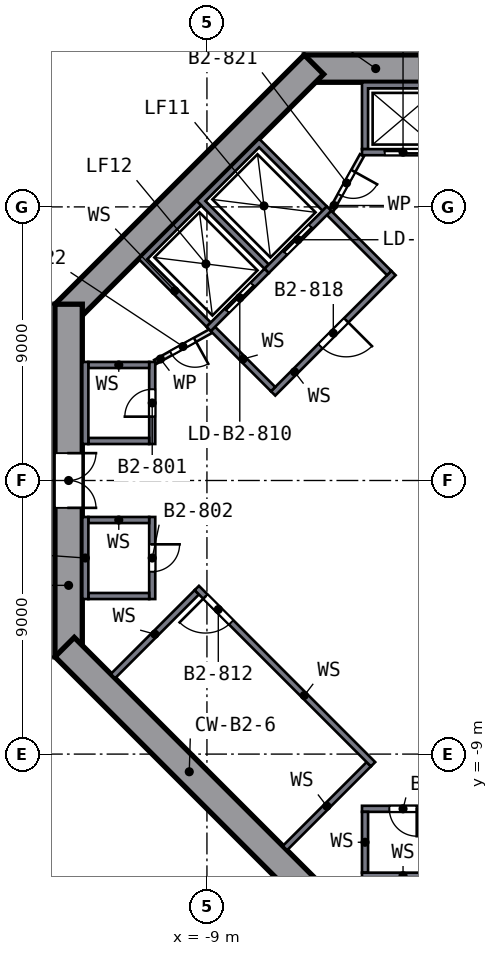
"""IFC4 building model, lengths in metres.
Left out: names, types, materials, properties, quantities, classifications, styles, units other than length and angle.
Written with IfcOpenShell. Run it as: python <this file> out.ifc"""

import sys

from ifc_helpers import new_model, si_unit, direction, frame, frame_2d, origin, place, context, subcontext, project, spatial, polyline, rectangle, outline, extrude, element, fill, save


model = new_model("IFC4")
c1 = context("Model", 3, precision=1e-05, world=origin(), true_north=direction((0.0, 1.0)))
c2 = subcontext(c1, "Body", "Model", "MODEL_VIEW")
j1 = project(units=[si_unit("LENGTHUNIT", "METRE"), si_unit("PLANEANGLEUNIT", "RADIAN")], contexts=[c1])
p1 = place(None, origin())
s1 = spatial("IfcSite", under=j1, at=p1, CompositionType="ELEMENT")
p2 = place(p1, origin())
s2 = spatial("IfcBuilding", under=s1, at=p2, CompositionType="ELEMENT")
p3 = place(p2, frame((0.0, 0.0, -7.8)))
s3 = spatial("IfcBuildingStorey", under=s2, at=p3, CompositionType="ELEMENT", Elevation=-7.8)
p4 = place(p3, frame((5.799, 13.55, 0.0), z_axis=(0.0, 0.0, 1.0), x_axis=(-1.0, 0.0, 0.0)))
e1 = element("IfcWall", 1, at=p4, inside=s3, PredefinedType="SHEAR", context=c2, shape_type="SweptSolid", body=[
    extrude(rectangle(XDim=11.598, YDim=0.9, at=frame_2d((5.799, 0.0))), origin(), (0.0, 0.0, 1.0), 3.9),
])
p5 = place(p4, frame((4.899, 0.0, 0.0)))
e2 = element("IfcOpeningElement", 2, at=p5, cuts=e1, PredefinedType="OPENING", context=c2, shape_type="SweptSolid", body=[
    extrude(rectangle(XDim=1.8, YDim=2.1, at=frame_2d((0.9, 1.05))), frame((0.0, 0.46, 0.0), z_axis=(0.0, -1.0, 0.0), x_axis=(1.0, 0.0, 0.0)), (0.0, 0.0, 1.0), 0.92),
])
p6 = place(p3, frame((-5.481, 13.682, 0.0), z_axis=(0.0, 0.0, 1.0), x_axis=(-0.707106781, -0.707106781, 0.0)))
e3 = element("IfcWall", 3, at=p6, inside=s3, PredefinedType="SHEAR", context=c2, shape_type="SweptSolid", body=[
    extrude(rectangle(XDim=11.598, YDim=0.9, at=frame_2d((5.799, 0.0))), origin(), (0.0, 0.0, 1.0), 3.9),
])
p7 = place(p3, frame((-13.55, 5.799, 0.0), z_axis=(0.0, 0.0, 1.0), x_axis=(0.0, -1.0, 0.0)))
e4 = element("IfcWall", 4, at=p7, inside=s3, PredefinedType="SHEAR", context=c2, shape_type="SweptSolid", body=[
    extrude(rectangle(XDim=11.598, YDim=0.9, at=frame_2d((5.799, 0.0))), origin(), (0.0, 0.0, 1.0), 3.9),
])
p8 = place(p7, frame((4.899, 0.0, 0.0)))
e5 = element("IfcOpeningElement", 5, at=p8, cuts=e4, PredefinedType="OPENING", context=c2, shape_type="SweptSolid", body=[
    extrude(rectangle(XDim=1.8, YDim=2.1, at=frame_2d((0.9, 1.05))), frame((0.0, 0.46, 0.0), z_axis=(0.0, -1.0, 0.0), x_axis=(1.0, 0.0, 0.0)), (0.0, 0.0, 1.0), 0.92),
])
p9 = place(p3, frame((-13.682, -5.481, 0.0), z_axis=(0.0, 0.0, 1.0), x_axis=(0.707106781, -0.707106781, 0.0)))
e6 = element("IfcWall", 6, at=p9, inside=s3, PredefinedType="SHEAR", context=c2, shape_type="SweptSolid", body=[
    extrude(rectangle(XDim=11.598, YDim=0.9, at=frame_2d((5.799, 0.0))), origin(), (0.0, 0.0, 1.0), 3.9),
])
p10 = place(p3, origin())
e7 = element("IfcWall", 7, at=p10, inside=s3, PredefinedType="SOLIDWALL", context=c2, shape_type="SweptSolid", body=[
    extrude(outline(polyline([(-3.9, 10.9), (-3.9, 13.1), (-1.2, 13.1), (-1.2, 10.9), (-1.4, 10.9), (-1.4, 12.9), (-3.7, 12.9), (-3.7, 10.9), (-3.9, 10.9)])), origin(), (0.0, 0.0, 1.0), 3.45),
])
p11 = place(p3, frame((-1.2, 10.8, 0.0), z_axis=(0.0, 0.0, 1.0), x_axis=(-1.0, 0.0, 0.0)))
e8 = element("IfcWall", 8, at=p11, inside=s3, PredefinedType="SOLIDWALL", context=c2, shape_type="SweptSolid", body=[
    extrude(rectangle(XDim=2.7, YDim=0.2, at=frame_2d((1.35, 0.0))), origin(), (0.0, 0.0, 1.0), 3.45),
])
p12 = place(p11, frame((0.75, 0.0, 0.0)))
e9 = element("IfcOpeningElement", 9, at=p12, cuts=e8, PredefinedType="OPENING", context=c2, shape_type="SweptSolid", body=[
    extrude(rectangle(XDim=1.2, YDim=2.1, at=frame_2d((0.6, 1.05))), frame((0.0, 0.11, 0.0), z_axis=(0.0, -1.0, 0.0), x_axis=(1.0, 0.0, 0.0)), (0.0, 0.0, 1.0), 0.22),
])
p13 = place(p3, origin())
e10 = element("IfcWall", 10, at=p13, inside=s3, PredefinedType="SOLIDWALL", context=c2, shape_type="SweptSolid", body=[
    extrude(outline(polyline([(-10.9, 1.2), (-12.9, 1.2), (-12.9, 1.4), (-10.9, 1.4), (-10.9, 1.2)])), origin(), (0.0, 0.0, 1.0), 3.45),
])
p14 = place(p3, origin())
e11 = element("IfcWall", 11, at=p14, inside=s3, PredefinedType="SOLIDWALL", context=c2, shape_type="SweptSolid", body=[
    extrude(outline(polyline([(-10.9, 3.7), (-12.9, 3.7), (-12.9, 3.9), (-10.9, 3.9), (-10.9, 3.7)])), origin(), (0.0, 0.0, 1.0), 3.45),
])
p15 = place(p3, origin())
e12 = element("IfcWall", 12, at=p15, inside=s3, PredefinedType="SOLIDWALL", context=c2, shape_type="SweptSolid", body=[
    extrude(outline(polyline([(-12.9, 1.2), (-13.1, 1.2), (-13.1, 3.9), (-12.9, 3.9), (-12.9, 1.2)])), origin(), (0.0, 0.0, 1.0), 3.45),
])
p16 = place(p3, frame((-10.8, 1.2, 0.0), z_axis=(0.0, 0.0, 1.0), x_axis=(0.0, 1.0, 0.0)))
e13 = element("IfcWall", 13, at=p16, inside=s3, PredefinedType="SOLIDWALL", context=c2, shape_type="SweptSolid", body=[
    extrude(rectangle(XDim=2.7, YDim=0.2, at=frame_2d((1.35, 0.0))), origin(), (0.0, 0.0, 1.0), 3.45),
])
p17 = place(p16, frame((0.9, 0.0, 0.0)))
e14 = element("IfcOpeningElement", 14, at=p17, cuts=e13, PredefinedType="OPENING", context=c2, shape_type="SweptSolid", body=[
    extrude(rectangle(XDim=0.9, YDim=2.1, at=frame_2d((0.45, 1.05))), frame((0.0, 0.11, 0.0), z_axis=(0.0, -1.0, 0.0), x_axis=(1.0, 0.0, 0.0)), (0.0, 0.0, 1.0), 0.22),
])
p18 = place(p3, origin())
e15 = element("IfcWall", 15, at=p18, inside=s3, PredefinedType="SOLIDWALL", context=c2, shape_type="SweptSolid", body=[
    extrude(outline(polyline([(-10.9, -1.2), (-10.9, -1.4), (-12.9, -1.4), (-12.9, -1.2), (-10.9, -1.2)])), origin(), (0.0, 0.0, 1.0), 3.45),
])
p19 = place(p3, origin())
e16 = element("IfcWall", 16, at=p19, inside=s3, PredefinedType="SOLIDWALL", context=c2, shape_type="SweptSolid", body=[
    extrude(outline(polyline([(-10.9, -3.7), (-10.9, -3.9), (-12.9, -3.9), (-12.9, -3.7), (-10.9, -3.7)])), origin(), (0.0, 0.0, 1.0), 3.45),
])
p20 = place(p3, origin())
e17 = element("IfcWall", 17, at=p20, inside=s3, PredefinedType="SOLIDWALL", context=c2, shape_type="SweptSolid", body=[
    extrude(outline(polyline([(-12.9, -1.2), (-12.9, -3.9), (-13.1, -3.9), (-13.1, -1.2), (-12.9, -1.2)])), origin(), (0.0, 0.0, 1.0), 3.45),
])
p21 = place(p3, frame((-10.8, -1.2, 0.0), z_axis=(0.0, 0.0, 1.0), x_axis=(0.0, -1.0, 0.0)))
e18 = element("IfcWall", 18, at=p21, inside=s3, PredefinedType="SOLIDWALL", context=c2, shape_type="SweptSolid", body=[
    extrude(rectangle(XDim=2.7, YDim=0.2, at=frame_2d((1.35, 0.0))), origin(), (0.0, 0.0, 1.0), 3.45),
])
p22 = place(p21, frame((0.9, 0.0, 0.0)))
e19 = element("IfcOpeningElement", 19, at=p22, cuts=e18, PredefinedType="OPENING", context=c2, shape_type="SweptSolid", body=[
    extrude(rectangle(XDim=0.9, YDim=2.1, at=frame_2d((0.45, 1.05))), frame((0.0, 0.11, 0.0), z_axis=(0.0, -1.0, 0.0), x_axis=(1.0, 0.0, 0.0)), (0.0, 0.0, 1.0), 0.22),
])
p23 = place(p3, origin())
e20 = element("IfcWall", 20, at=p23, inside=s3, PredefinedType="SOLIDWALL", context=c2, shape_type="SweptSolid", body=[
    extrude(outline(polyline([(-3.7, -10.9), (-3.7, -12.9), (-3.9, -12.9), (-3.9, -10.9), (-3.7, -10.9)])), origin(), (0.0, 0.0, 1.0), 3.45),
])
p24 = place(p3, origin())
e21 = element("IfcWall", 21, at=p24, inside=s3, PredefinedType="SOLIDWALL", context=c2, shape_type="SweptSolid", body=[
    extrude(outline(polyline([(-1.2, -12.9), (-1.2, -13.1), (-3.9, -13.1), (-3.9, -12.9), (-1.2, -12.9)])), origin(), (0.0, 0.0, 1.0), 3.45),
])
p25 = place(p3, frame((-1.2, -10.8, 0.0), z_axis=(0.0, 0.0, 1.0), x_axis=(-1.0, 0.0, 0.0)))
e22 = element("IfcWall", 22, at=p25, inside=s3, PredefinedType="SOLIDWALL", context=c2, shape_type="SweptSolid", body=[
    extrude(rectangle(XDim=2.7, YDim=0.2, at=frame_2d((1.35, 0.0))), origin(), (0.0, 0.0, 1.0), 3.45),
])
p26 = place(p25, frame((0.9, 0.0, 0.0)))
e23 = element("IfcOpeningElement", 23, at=p26, cuts=e22, PredefinedType="OPENING", context=c2, shape_type="SweptSolid", body=[
    extrude(rectangle(XDim=0.9, YDim=2.1, at=frame_2d((0.45, 1.05))), frame((0.0, 0.11, 0.0), z_axis=(0.0, -1.0, 0.0), x_axis=(1.0, 0.0, 0.0)), (0.0, 0.0, 1.0), 0.22),
])
p27 = place(p3, origin())
e24 = element("IfcWall", 24, at=p27, inside=s3, PredefinedType="SOLIDWALL", context=c2, shape_type="SweptSolid", body=[
    extrude(outline(polyline([(-9.334, 9.192), (-7.283, 11.243), (-5.056, 9.016), (-5.197, 8.874), (-7.283, 10.96), (-9.051, 9.192), (-6.965, 7.106), (-7.106, 6.965), (-9.334, 9.192)])), origin(), (0.0, 0.0, 1.0), 3.45),
])
p28 = place(p3, frame((-4.985, 8.945, 0.0), z_axis=(0.0, 0.0, 1.0), x_axis=(-0.707106781, -0.707106781, 0.0)))
e25 = element("IfcWall", 25, at=p28, inside=s3, PredefinedType="SOLIDWALL", context=c2, shape_type="SweptSolid", body=[
    extrude(rectangle(XDim=2.9, YDim=0.2, at=frame_2d((1.45, 0.0))), origin(), (0.0, 0.0, 1.0), 3.45),
])
p29 = place(p28, frame((0.85, 0.0, 0.0)))
e26 = element("IfcOpeningElement", 26, at=p29, cuts=e25, PredefinedType="OPENING", context=c2, shape_type="SweptSolid", body=[
    extrude(rectangle(XDim=1.2, YDim=2.1, at=frame_2d((0.6, 1.05))), frame((0.0, 0.11, 0.0), z_axis=(0.0, -1.0, 0.0), x_axis=(1.0, 0.0, 0.0)), (0.0, 0.0, 1.0), 0.22),
])
p30 = place(p3, origin())
e27 = element("IfcWall", 27, at=p30, inside=s3, PredefinedType="SOLIDWALL", context=c2, shape_type="SweptSolid", body=[
    extrude(outline(polyline([(-11.243, 7.283), (-9.334, 9.192), (-9.192, 9.051), (-10.96, 7.283), (-8.874, 5.197), (-9.016, 5.056), (-11.243, 7.283)])), origin(), (0.0, 0.0, 1.0), 3.45),
])
p31 = place(p3, frame((-7.036, 6.894, 0.0), z_axis=(0.0, 0.0, 1.0), x_axis=(-0.707106781, -0.707106781, 0.0)))
e28 = element("IfcWall", 28, at=p31, inside=s3, PredefinedType="SOLIDWALL", context=c2, shape_type="SweptSolid", body=[
    extrude(rectangle(XDim=2.7, YDim=0.2, at=frame_2d((1.35, 0.0))), origin(), (0.0, 0.0, 1.0), 3.45),
])
p32 = place(p31, frame((0.65, 0.0, 0.0)))
e29 = element("IfcOpeningElement", 29, at=p32, cuts=e28, PredefinedType="OPENING", context=c2, shape_type="SweptSolid", body=[
    extrude(rectangle(XDim=1.2, YDim=2.1, at=frame_2d((0.6, 1.05))), frame((0.0, 0.11, 0.0), z_axis=(0.0, -1.0, 0.0), x_axis=(1.0, 0.0, 0.0)), (0.0, 0.0, 1.0), 0.22),
])
p33 = place(p3, frame((-3.535, -9.334, 0.0), z_axis=(0.0, 0.0, 1.0), x_axis=(-0.707106781, 0.707106781, 0.0)))
e30 = element("IfcWall", 30, at=p33, inside=s3, PredefinedType="SOLIDWALL", context=c2, shape_type="SweptSolid", body=[
    extrude(rectangle(XDim=8.2, YDim=0.2, at=frame_2d((4.1, 0.0))), origin(), (0.0, 0.0, 1.0), 3.45),
])
p34 = place(p33, frame((6.6, 0.0, 0.0)))
e31 = element("IfcOpeningElement", 31, at=p34, cuts=e30, PredefinedType="OPENING", context=c2, shape_type="SweptSolid", body=[
    extrude(rectangle(XDim=1.2, YDim=2.1, at=frame_2d((0.6, 1.05))), frame((0.0, 0.11, 0.0), z_axis=(0.0, -1.0, 0.0), x_axis=(1.0, 0.0, 0.0)), (0.0, 0.0, 1.0), 0.22),
])
for number, where, z_axis, x_axis in (
    (32, (-9.334, -3.677, 0.0), (0.0, 0.0, 1.0), (-0.707, -0.707, 0.0)),
    (33, (-3.677, -9.334, 0.0), (0.0, 0.0, 1.0), (-0.707, -0.707, 0.0)),
):
    element("IfcWall", number, at=place(p3, frame(where, z_axis=z_axis, x_axis=x_axis)), inside=s3, PredefinedType="SOLIDWALL", context=c2, shape_type="SweptSolid", body=[
        extrude(rectangle(XDim=3.9, YDim=0.2, at=frame_2d((1.95, 0.0))), origin(), (0.0, 0.0, 1.0), 3.45),
    ])
p35 = place(p3, frame((-2.864, 6.823, 0.0), z_axis=(0.0, 0.0, 1.0), x_axis=(-0.707106781, -0.707106781, 0.0)))
e34 = element("IfcWall", 34, at=p35, inside=s3, PredefinedType="SOLIDWALL", context=c2, shape_type="SweptSolid", body=[
    extrude(rectangle(XDim=5.6, YDim=0.2, at=frame_2d((2.8, 0.0))), origin(), (0.0, 0.0, 1.0), 3.45),
])
p36 = place(p35, frame((2.2, 0.0, 0.0)))
e35 = element("IfcOpeningElement", 35, at=p36, cuts=e34, PredefinedType="OPENING", context=c2, shape_type="SweptSolid", body=[
    extrude(rectangle(XDim=1.2, YDim=2.1, at=frame_2d((0.6, 1.05))), frame((0.0, 0.11, 0.0), z_axis=(0.0, -1.0, 0.0), x_axis=(1.0, 0.0, 0.0)), (0.0, 0.0, 1.0), 0.22),
])
for number, where, z_axis, x_axis in (
    (36, (-3.005, 6.823, 0.0), (0.0, 0.0, 1.0), (-0.707, 0.707, 0.0)),
    (37, (-6.823, 3.005, 0.0), (0.0, 0.0, 1.0), (-0.707, 0.707, 0.0)),
):
    element("IfcWall", number, at=place(p3, frame(where, z_axis=z_axis, x_axis=x_axis)), inside=s3, PredefinedType="SOLIDWALL", context=c2, shape_type="SweptSolid", body=[
        extrude(rectangle(XDim=2.8, YDim=0.2, at=frame_2d((1.4, 0.0))), origin(), (0.0, 0.0, 1.0), 3.45),
    ])
p37 = place(p3, frame((-3.9, 10.7, 0.0), z_axis=(0.0, 0.0, 1.0), x_axis=(-0.485692555, -0.874129705, 0.0)))
e38 = element("IfcWall", 38, at=p37, inside=s3, PredefinedType="PARTITIONING", context=c2, shape_type="SweptSolid", body=[
    extrude(rectangle(XDim=2.089, YDim=0.15, at=frame_2d((1.044, 0.0))), origin(), (0.0, 0.0, 1.0), 3.45),
])
p38 = place(p37, frame((0.594, 0.0, 0.0)))
e39 = element("IfcOpeningElement", 39, at=p38, cuts=e38, PredefinedType="OPENING", context=c2, shape_type="SweptSolid", body=[
    extrude(rectangle(XDim=0.9, YDim=2.1, at=frame_2d((0.45, 1.05))), frame((0.0, 0.085, 0.0), z_axis=(0.0, -1.0, 0.0), x_axis=(1.0, 0.0, 0.0)), (0.0, 0.0, 1.0), 0.17),
])
p39 = place(p3, frame((-8.874, 4.914, 0.0), z_axis=(0.0, 0.0, 1.0), x_axis=(-0.874129705, -0.485692555, 0.0)))
e40 = element("IfcWall", 40, at=p39, inside=s3, PredefinedType="PARTITIONING", context=c2, shape_type="SweptSolid", body=[
    extrude(rectangle(XDim=2.089, YDim=0.15, at=frame_2d((1.044, 0.0))), origin(), (0.0, 0.0, 1.0), 3.45),
])
p40 = place(p39, frame((0.594, 0.0, 0.0)))
e41 = element("IfcOpeningElement", 41, at=p40, cuts=e40, PredefinedType="OPENING", context=c2, shape_type="SweptSolid", body=[
    extrude(rectangle(XDim=0.9, YDim=2.1, at=frame_2d((0.45, 1.05))), frame((0.0, 0.085, 0.0), z_axis=(0.0, -1.0, 0.0), x_axis=(1.0, 0.0, 0.0)), (0.0, 0.0, 1.0), 0.17),
])
p41 = place(p17, origin())
e42 = element("IfcDoor", 42, at=p41, inside=s3, OperationType="SINGLE_SWING_LEFT", PredefinedType="DOOR", context=c2, shape_type="SweptSolid", body=[
    extrude(rectangle(XDim=0.9, YDim=2.1, at=frame_2d((0.45, 1.05))), frame((0.0, 0.025, 0.0), z_axis=(0.0, -1.0, 0.0), x_axis=(1.0, 0.0, 0.0)), (0.0, 0.0, 1.0), 0.05),
])
fill(e14, e42)
p42 = place(p22, origin())
e43 = element("IfcDoor", 43, at=p42, inside=s3, OperationType="SINGLE_SWING_LEFT", PredefinedType="DOOR", context=c2, shape_type="SweptSolid", body=[
    extrude(rectangle(XDim=0.9, YDim=2.1, at=frame_2d((0.45, 1.05))), frame((0.0, 0.025, 0.0), z_axis=(0.0, -1.0, 0.0), x_axis=(1.0, 0.0, 0.0)), (0.0, 0.0, 1.0), 0.05),
])
fill(e19, e43)
p43 = place(p26, origin())
e44 = element("IfcDoor", 44, at=p43, inside=s3, OperationType="SINGLE_SWING_LEFT", PredefinedType="DOOR", context=c2, shape_type="SweptSolid", body=[
    extrude(rectangle(XDim=0.9, YDim=2.1, at=frame_2d((0.45, 1.05))), frame((0.0, 0.025, 0.0), z_axis=(0.0, -1.0, 0.0), x_axis=(1.0, 0.0, 0.0)), (0.0, 0.0, 1.0), 0.05),
])
fill(e23, e44)
p44 = place(p12, origin())
e45 = element("IfcDoor", 45, at=p44, inside=s3, OperationType="DOUBLE_DOOR_SLIDING", PredefinedType="DOOR", context=c2, shape_type="SweptSolid", body=[
    extrude(rectangle(XDim=1.2, YDim=2.1, at=frame_2d((0.6, 1.05))), frame((0.0, 0.025, 0.0), z_axis=(0.0, -1.0, 0.0), x_axis=(1.0, 0.0, 0.0)), (0.0, 0.0, 1.0), 0.05),
])
fill(e9, e45)
p45 = place(p29, origin())
e46 = element("IfcDoor", 46, at=p45, inside=s3, OperationType="DOUBLE_DOOR_SLIDING", PredefinedType="DOOR", context=c2, shape_type="SweptSolid", body=[
    extrude(rectangle(XDim=1.2, YDim=2.1, at=frame_2d((0.6, 1.05))), frame((0.0, 0.025, 0.0), z_axis=(0.0, -1.0, 0.0), x_axis=(1.0, 0.0, 0.0)), (0.0, 0.0, 1.0), 0.05),
])
fill(e26, e46)
p46 = place(p32, origin())
e47 = element("IfcDoor", 47, at=p46, inside=s3, OperationType="DOUBLE_DOOR_SLIDING", PredefinedType="DOOR", context=c2, shape_type="SweptSolid", body=[
    extrude(rectangle(XDim=1.2, YDim=2.1, at=frame_2d((0.6, 1.05))), frame((0.0, 0.025, 0.0), z_axis=(0.0, -1.0, 0.0), x_axis=(1.0, 0.0, 0.0)), (0.0, 0.0, 1.0), 0.05),
])
fill(e29, e47)
p47 = place(p34, origin())
e48 = element("IfcDoor", 48, at=p47, inside=s3, OperationType="SINGLE_SWING_RIGHT", PredefinedType="DOOR", context=c2, shape_type="SweptSolid", body=[
    extrude(rectangle(XDim=1.2, YDim=2.1, at=frame_2d((0.6, 1.05))), frame((0.0, 0.025, 0.0), z_axis=(0.0, -1.0, 0.0), x_axis=(1.0, 0.0, 0.0)), (0.0, 0.0, 1.0), 0.05),
])
fill(e31, e48)
p48 = place(p8, origin())
e49 = element("IfcDoor", 49, at=p48, inside=s3, OperationType="DOUBLE_DOOR_SINGLE_SWING", PredefinedType="DOOR", context=c2, shape_type="SweptSolid", body=[
    extrude(rectangle(XDim=1.8, YDim=2.1, at=frame_2d((0.9, 1.05))), frame((0.0, 0.025, 0.0), z_axis=(0.0, -1.0, 0.0), x_axis=(1.0, 0.0, 0.0)), (0.0, 0.0, 1.0), 0.05),
])
fill(e5, e49)
p49 = place(p36, origin())
e50 = element("IfcDoor", 50, at=p49, inside=s3, OperationType="SINGLE_SWING_LEFT", PredefinedType="DOOR", context=c2, shape_type="SweptSolid", body=[
    extrude(rectangle(XDim=1.2, YDim=2.1, at=frame_2d((0.6, 1.05))), frame((0.0, 0.025, 0.0), z_axis=(0.0, -1.0, 0.0), x_axis=(1.0, 0.0, 0.0)), (0.0, 0.0, 1.0), 0.05),
])
fill(e35, e50)
p50 = place(p38, origin())
e51 = element("IfcDoor", 51, at=p50, inside=s3, OperationType="SINGLE_SWING_LEFT", PredefinedType="DOOR", context=c2, shape_type="SweptSolid", body=[
    extrude(rectangle(XDim=0.9, YDim=2.1, at=frame_2d((0.45, 1.05))), frame((0.0, 0.025, 0.0), z_axis=(0.0, -1.0, 0.0), x_axis=(1.0, 0.0, 0.0)), (0.0, 0.0, 1.0), 0.05),
])
fill(e39, e51)
p51 = place(p40, origin())
e52 = element("IfcDoor", 52, at=p51, inside=s3, OperationType="SINGLE_SWING_LEFT", PredefinedType="DOOR", context=c2, shape_type="SweptSolid", body=[
    extrude(rectangle(XDim=0.9, YDim=2.1, at=frame_2d((0.45, 1.05))), frame((0.0, 0.025, 0.0), z_axis=(0.0, -1.0, 0.0), x_axis=(1.0, 0.0, 0.0)), (0.0, 0.0, 1.0), 0.05),
])
fill(e41, e52)
save(model, sys.argv[1])
